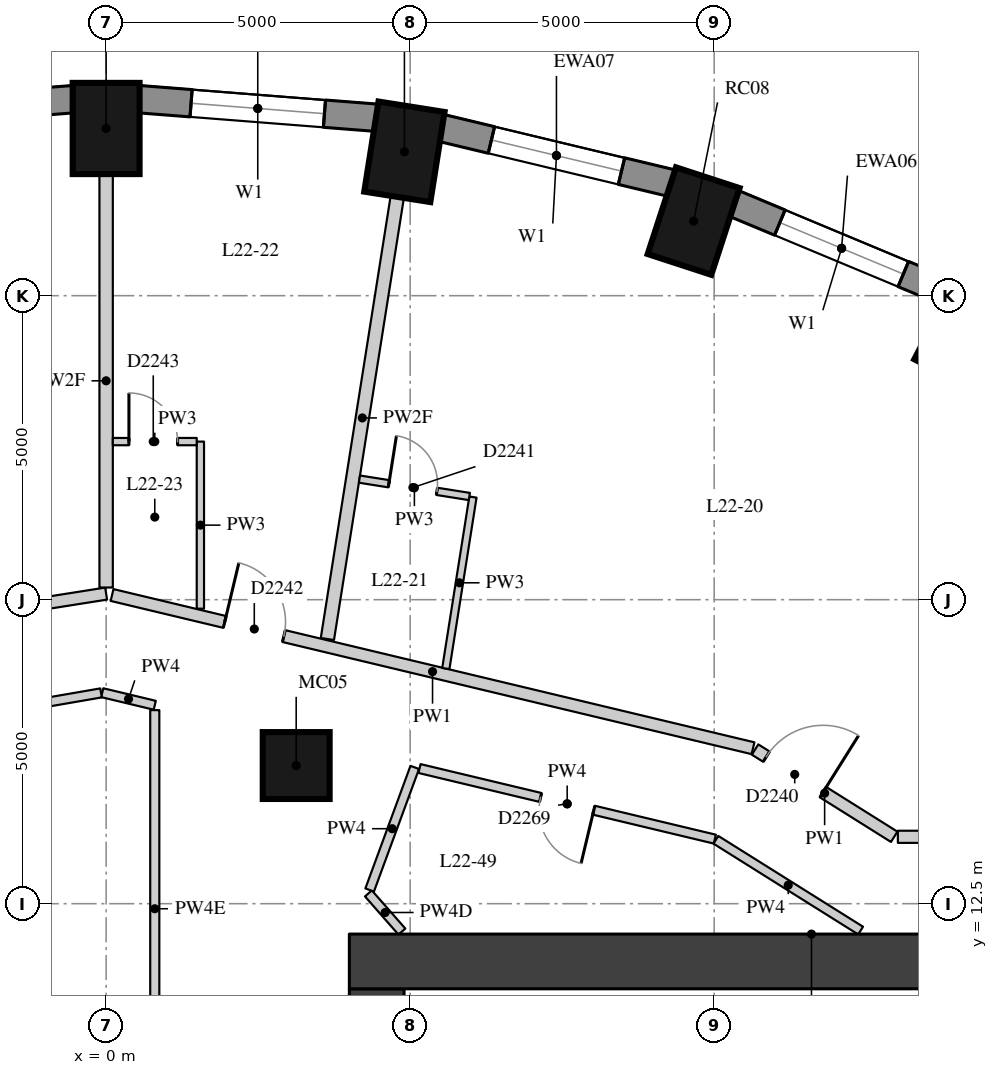
"""IFC4 building model, lengths in metres.
Left out: names, types, materials, properties, quantities, classifications, styles, units other than length and angle.
Written with IfcOpenShell. Run it as: python <this file> out.ifc"""

import sys

from ifc_helpers import new_model, si_unit, direction, frame, frame_2d, origin, origin_2d, place, context, subcontext, project, spatial, rectangle, extrude, element, fill, save


model = new_model("IFC4")
c1 = context("Model", 3, precision=1e-05, world=origin(), true_north=direction((0.0, 1.0)))
c2 = subcontext(c1, "Body", "Model", "MODEL_VIEW")
j1 = project(units=[si_unit("LENGTHUNIT", "METRE"), si_unit("PLANEANGLEUNIT", "RADIAN")], contexts=[c1])
p1 = place(None, origin())
s1 = spatial("IfcSite", under=j1, at=p1, CompositionType="ELEMENT")
p2 = place(p1, origin())
s2 = spatial("IfcBuilding", under=s1, at=p2, CompositionType="ELEMENT")
p3 = place(p2, frame((0.0, 0.0, 81.1)))
s3 = spatial("IfcBuildingStorey", under=s2, at=p3, CompositionType="ELEMENT", Elevation=81.1)
for number, where, z_axis, x_axis in (
    (1, (14.125, 21.867, 0.0), (0.0, 0.0, 1.0), (0.46, 0.888, 0.0)),
    (2, (9.662, 23.727, 0.0), (0.0, 0.0, 1.0), (0.31, 0.951, 0.0)),
    (3, (4.906, 24.866, 0.0), (0.0, 0.0, 1.0), (0.156, 0.988, 0.0)),
    (4, (0.0, 25.25, 0.0), (0.0, 0.0, 1.0), (0.0, 1.0, 0.0)),
):
    element("IfcColumn", number, at=place(p3, frame(where, z_axis=z_axis, x_axis=x_axis)), inside=s3, PredefinedType="COLUMN", context=c2, shape_type="SweptSolid", body=[
        extrude(rectangle(XDim=1.5, YDim=1.1, at=origin_2d()), origin(), (0.0, 0.0, 1.0), 3.3),
    ])
p4 = place(p3, frame((3.126, 14.772, 0.0), z_axis=(0.0, 0.0, 1.0), x_axis=(1.0, 0.0, 0.0)))
e5 = element("IfcColumn", 5, at=p4, inside=s3, PredefinedType="COLUMN", context=c2, shape_type="SweptSolid", body=[
    extrude(rectangle(XDim=1.1, YDim=1.1, at=origin_2d()), origin(), (0.0, 0.0, 1.0), 3.3),
])
p5 = place(p3, frame((13.875, 22.537, 0.0), z_axis=(0.0, 0.0, 1.0), x_axis=(-0.923031964282, 0.384723267966, 0.0)))
e6 = element("IfcWall", 6, at=p5, inside=s3, PredefinedType="SOLIDWALL", context=c2, shape_type="SweptSolid", body=[
    extrude(rectangle(XDim=3.856, YDim=0.45, at=frame_2d((1.928, 0.0))), origin(), (0.0, 0.0, 1.0), 2.85),
])
p6 = place(p5, frame((0.828, 0.0, 0.4)))
e7 = element("IfcOpeningElement", 7, at=p6, cuts=e6, PredefinedType="OPENING", context=c2, shape_type="SweptSolid", body=[
    extrude(rectangle(XDim=2.2, YDim=1.75, at=frame_2d((1.1, 0.875))), frame((0.0, 0.235, 0.0), z_axis=(0.0, -1.0, 0.0), x_axis=(1.0, 0.0, 0.0)), (0.0, 0.0, 1.0), 0.47),
])
p7 = place(p3, frame((9.308, 24.35, 0.0), z_axis=(0.0, 0.0, 1.0), x_axis=(-0.972496561493, 0.232917233979, 0.0)))
e8 = element("IfcWall", 8, at=p7, inside=s3, PredefinedType="SOLIDWALL", context=c2, shape_type="SweptSolid", body=[
    extrude(rectangle(XDim=3.911, YDim=0.45, at=frame_2d((1.956, 0.0))), origin(), (0.0, 0.0, 1.0), 2.85),
])
p8 = place(p7, frame((0.855, 0.0, 0.4)))
e9 = element("IfcOpeningElement", 9, at=p8, cuts=e8, PredefinedType="OPENING", context=c2, shape_type="SweptSolid", body=[
    extrude(rectangle(XDim=2.2, YDim=1.75, at=frame_2d((1.1, 0.875))), frame((0.0, 0.235, 0.0), z_axis=(0.0, -1.0, 0.0), x_axis=(1.0, 0.0, 0.0)), (0.0, 0.0, 1.0), 0.47),
])
p9 = place(p3, frame((4.457, 25.426, 0.0), z_axis=(0.0, 0.0, 1.0), x_axis=(-0.996955972145, 0.077966592873, 0.0)))
e10 = element("IfcWall", 10, at=p9, inside=s3, PredefinedType="SOLIDWALL", context=c2, shape_type="SweptSolid", body=[
    extrude(rectangle(XDim=3.939, YDim=0.45, at=frame_2d((1.97, 0.0))), origin(), (0.0, 0.0, 1.0), 2.85),
])
p10 = place(p9, frame((0.87, 0.0, 0.4)))
e11 = element("IfcOpeningElement", 11, at=p10, cuts=e10, PredefinedType="OPENING", context=c2, shape_type="SweptSolid", body=[
    extrude(rectangle(XDim=2.2, YDim=1.75, at=frame_2d((1.1, 0.875))), frame((0.0, 0.235, 0.0), z_axis=(0.0, -1.0, 0.0), x_axis=(1.0, 0.0, 0.0)), (0.0, 0.0, 1.0), 0.47),
])
p11 = place(p3, frame((-0.53, 25.733, 0.0), z_axis=(0.0, 0.0, 1.0), x_axis=(-0.996955972145, -0.077966592873, 0.0)))
e12 = element("IfcWall", 12, at=p11, inside=s3, PredefinedType="SOLIDWALL", context=c2, shape_type="SweptSolid", body=[
    extrude(rectangle(XDim=3.939, YDim=0.45, at=frame_2d((1.97, 0.0))), origin(), (0.0, 0.0, 1.0), 2.85),
])
p12 = place(p11, frame((0.87, 0.0, 0.4)))
e13 = element("IfcOpeningElement", 13, at=p12, cuts=e12, PredefinedType="OPENING", context=c2, shape_type="SweptSolid", body=[
    extrude(rectangle(XDim=2.2, YDim=1.75, at=frame_2d((1.1, 0.875))), frame((0.0, 0.235, 0.0), z_axis=(0.0, -1.0, 0.0), x_axis=(1.0, 0.0, 0.0)), (0.0, 0.0, 1.0), 0.47),
])
p13 = place(p3, frame((4.45, -11.1, 0.0), z_axis=(0.0, 0.0, 1.0), x_axis=(0.0, 1.0, 0.0)))
e14 = element("IfcWall", 14, at=p13, inside=s3, PredefinedType="SHEAR", context=c2, shape_type="SweptSolid", body=[
    extrude(rectangle(XDim=22.2, YDim=0.9, at=frame_2d((11.1, 0.0))), origin(), (0.0, 0.0, 1.0), 2.85),
])
p14 = place(p13, frame((2.35, 0.0, 0.0)))
e15 = element("IfcOpeningElement", 15, at=p14, cuts=e14, PredefinedType="OPENING", context=c2, shape_type="SweptSolid", body=[
    extrude(rectangle(XDim=1.5, YDim=2.1, at=frame_2d((0.75, 1.05))), frame((0.0, 0.46, 0.0), z_axis=(0.0, -1.0, 0.0), x_axis=(1.0, 0.0, 0.0)), (0.0, 0.0, 1.0), 0.92),
])
p15 = place(p13, frame((5.45, 0.0, 0.0)))
e16 = element("IfcOpeningElement", 16, at=p15, cuts=e14, PredefinedType="OPENING", context=c2, shape_type="SweptSolid", body=[
    extrude(rectangle(XDim=1.8, YDim=2.1, at=frame_2d((0.9, 1.05))), frame((0.0, 0.46, 0.0), z_axis=(0.0, -1.0, 0.0), x_axis=(1.0, 0.0, 0.0)), (0.0, 0.0, 1.0), 0.92),
])
p16 = place(p13, frame((7.95, 0.0, 0.0)))
e17 = element("IfcOpeningElement", 17, at=p16, cuts=e14, PredefinedType="OPENING", context=c2, shape_type="SweptSolid", body=[
    extrude(rectangle(XDim=1.1, YDim=2.1, at=frame_2d((0.55, 1.05))), frame((0.0, 0.46, 0.0), z_axis=(0.0, -1.0, 0.0), x_axis=(1.0, 0.0, 0.0)), (0.0, 0.0, 1.0), 0.92),
])
p17 = place(p13, frame((10.6, 0.0, 0.0)))
e18 = element("IfcOpeningElement", 18, at=p17, cuts=e14, PredefinedType="OPENING", context=c2, shape_type="SweptSolid", body=[
    extrude(rectangle(XDim=1.0, YDim=2.1, at=frame_2d((0.5, 1.05))), frame((0.0, 0.46, 0.0), z_axis=(0.0, -1.0, 0.0), x_axis=(1.0, 0.0, 0.0)), (0.0, 0.0, 1.0), 0.92),
])
p18 = place(p13, frame((13.15, 0.0, 0.0)))
e19 = element("IfcOpeningElement", 19, at=p18, cuts=e14, PredefinedType="OPENING", context=c2, shape_type="SweptSolid", body=[
    extrude(rectangle(XDim=1.1, YDim=2.1, at=frame_2d((0.55, 1.05))), frame((0.0, 0.46, 0.0), z_axis=(0.0, -1.0, 0.0), x_axis=(1.0, 0.0, 0.0)), (0.0, 0.0, 1.0), 0.92),
])
p19 = place(p13, frame((14.95, 0.0, 0.0)))
e20 = element("IfcOpeningElement", 20, at=p19, cuts=e14, PredefinedType="OPENING", context=c2, shape_type="SweptSolid", body=[
    extrude(rectangle(XDim=1.8, YDim=2.1, at=frame_2d((0.9, 1.05))), frame((0.0, 0.46, 0.0), z_axis=(0.0, -1.0, 0.0), x_axis=(1.0, 0.0, 0.0)), (0.0, 0.0, 1.0), 0.92),
])
p20 = place(p13, frame((18.35, 0.0, 0.0)))
e21 = element("IfcOpeningElement", 21, at=p20, cuts=e14, PredefinedType="OPENING", context=c2, shape_type="SweptSolid", body=[
    extrude(rectangle(XDim=1.5, YDim=2.1, at=frame_2d((0.75, 1.05))), frame((0.0, 0.46, 0.0), z_axis=(0.0, -1.0, 0.0), x_axis=(1.0, 0.0, 0.0)), (0.0, 0.0, 1.0), 0.92),
])
p21 = place(p3, frame((4.0, 11.55, 0.0), z_axis=(0.0, 0.0, 1.0), x_axis=(1.0, 0.0, 0.0)))
e22 = element("IfcWall", 22, at=p21, inside=s3, PredefinedType="SHEAR", context=c2, shape_type="SweptSolid", body=[
    extrude(rectangle(XDim=15.2, YDim=0.9, at=frame_2d((7.6, 0.0))), origin(), (0.0, 0.0, 1.0), 2.85),
])
p22 = place(p3, frame((-7.194, 16.466, 0.0), z_axis=(0.0, 0.0, 1.0), x_axis=(0.987792302219, 0.155776659599, 0.0)))
e23 = element("IfcWall", 23, at=p22, inside=s3, PredefinedType="PARTITIONING", context=c2, shape_type="SweptSolid", body=[
    extrude(rectangle(XDim=7.283, YDim=0.2, at=frame_2d((3.642, 0.0))), origin(), (0.0, 0.0, 1.0), 2.85),
])
p23 = place(p22, frame((2.27, 0.0, 0.0)))
e24 = element("IfcOpeningElement", 24, at=p23, cuts=e23, PredefinedType="OPENING", context=c2, shape_type="SweptSolid", body=[
    extrude(rectangle(XDim=1.1, YDim=2.1, at=frame_2d((0.55, 1.05))), frame((0.0, 0.11, 0.0), z_axis=(0.0, -1.0, 0.0), x_axis=(1.0, 0.0, 0.0)), (0.0, 0.0, 1.0), 0.22),
])
p24 = place(p3, frame((0.098, 17.577, 0.0), z_axis=(0.0, 0.0, 1.0), x_axis=(0.97259262522, -0.232515774447, 0.0)))
e25 = element("IfcWall", 25, at=p24, inside=s3, PredefinedType="PARTITIONING", context=c2, shape_type="SweptSolid", body=[
    extrude(rectangle(XDim=10.838, YDim=0.2, at=frame_2d((5.419, 0.0))), origin(), (0.0, 0.0, 1.0), 2.85),
])
p25 = place(p24, frame((1.905, 0.0, 0.0)))
e26 = element("IfcOpeningElement", 26, at=p25, cuts=e25, PredefinedType="OPENING", context=c2, shape_type="SweptSolid", body=[
    extrude(rectangle(XDim=1.0, YDim=2.1, at=frame_2d((0.5, 1.05))), frame((0.0, 0.11, 0.0), z_axis=(0.0, -1.0, 0.0), x_axis=(1.0, 0.0, 0.0)), (0.0, 0.0, 1.0), 0.22),
])
p26 = place(p3, frame((10.672, 15.035, 0.0), z_axis=(0.0, 0.0, 1.0), x_axis=(0.847149253931, -0.531355005213, 0.0)))
e27 = element("IfcWall", 27, at=p26, inside=s3, PredefinedType="PARTITIONING", context=c2, shape_type="SweptSolid", body=[
    extrude(rectangle(XDim=2.701, YDim=0.2, at=frame_2d((1.351, 0.0))), origin(), (0.0, 0.0, 1.0), 2.85),
])
p27 = place(p26, frame((0.22, 0.0, 0.0)))
e28 = element("IfcOpeningElement", 28, at=p27, cuts=e27, PredefinedType="OPENING", context=c2, shape_type="SweptSolid", body=[
    extrude(rectangle(XDim=1.1, YDim=2.1, at=frame_2d((0.55, 1.05))), frame((0.0, 0.11, 0.0), z_axis=(0.0, -1.0, 0.0), x_axis=(1.0, 0.0, 0.0)), (0.0, 0.0, 1.0), 0.22),
])
p28 = place(p3, frame((13.021, 13.6, 0.0), z_axis=(0.0, 0.0, 1.0), x_axis=(1.0, 0.0, 0.0)))
e29 = element("IfcWall", 29, at=p28, inside=s3, PredefinedType="PARTITIONING", context=c2, shape_type="SweptSolid", body=[
    extrude(rectangle(XDim=7.779, YDim=0.2, at=frame_2d((3.89, 0.0))), origin(), (0.0, 0.0, 1.0), 2.85),
])
p29 = place(p3, frame((-0.064, 15.97, 0.0), z_axis=(0.0, 0.0, 1.0), x_axis=(0.97258159508, -0.232561907699, 0.0)))
e30 = element("IfcWall", 30, at=p29, inside=s3, PredefinedType="PARTITIONING", context=c2, shape_type="SweptSolid", body=[
    extrude(rectangle(XDim=0.888, YDim=0.15, at=frame_2d((0.444, 0.0))), origin(), (0.0, 0.0, 1.0), 2.85),
])
p30 = place(p3, frame((0.8, 15.684, 0.0), z_axis=(0.0, 0.0, 1.0), x_axis=(0.0, -1.0, 0.0)))
e31 = element("IfcWall", 31, at=p30, inside=s3, PredefinedType="PARTITIONING", context=c2, shape_type="SweptSolid", body=[
    extrude(rectangle(XDim=6.534, YDim=0.15, at=frame_2d((3.267, 0.0))), origin(), (0.0, 0.0, 1.0), 2.3),
])
p31 = place(p3, frame((-7.021, 14.769, 0.0), z_axis=(0.0, 0.0, 1.0), x_axis=(0.985427060344, 0.170098526569, 0.0)))
e32 = element("IfcWall", 32, at=p31, inside=s3, PredefinedType="PARTITIONING", context=c2, shape_type="SweptSolid", body=[
    extrude(rectangle(XDim=7.04, YDim=0.15, at=frame_2d((3.52, 0.0))), origin(), (0.0, 0.0, 1.0), 2.4),
])
p32 = place(p3, frame((4.865, 12.042, 0.0), z_axis=(0.0, 0.0, 1.0), x_axis=(-0.660014599896, 0.751252772323, 0.0)))
e33 = element("IfcWall", 33, at=p32, inside=s3, PredefinedType="PARTITIONING", context=c2, shape_type="SweptSolid", body=[
    extrude(rectangle(XDim=0.835, YDim=0.15, at=frame_2d((0.417, 0.0))), origin(), (0.0, 0.0, 1.0), 2.4),
])
p33 = place(p3, frame((4.334, 12.725, 0.0), z_axis=(0.0, 0.0, 1.0), x_axis=(0.345226102509, 0.938519545959, 0.0)))
e34 = element("IfcWall", 34, at=p33, inside=s3, PredefinedType="PARTITIONING", context=c2, shape_type="SweptSolid", body=[
    extrude(rectangle(XDim=2.148, YDim=0.15, at=frame_2d((1.074, 0.0))), origin(), (0.0, 0.0, 1.0), 2.85),
])
p34 = place(p3, frame((5.154, 14.723, 0.0), z_axis=(0.0, 0.0, 1.0), x_axis=(0.972595476038, -0.232503849411, 0.0)))
e35 = element("IfcWall", 35, at=p34, inside=s3, PredefinedType="PARTITIONING", context=c2, shape_type="SweptSolid", body=[
    extrude(rectangle(XDim=4.994, YDim=0.15, at=frame_2d((2.497, 0.0))), origin(), (0.0, 0.0, 1.0), 2.85),
])
p35 = place(p34, frame((2.047, 0.0, 0.0)))
e36 = element("IfcOpeningElement", 36, at=p35, cuts=e35, PredefinedType="OPENING", context=c2, shape_type="SweptSolid", body=[
    extrude(rectangle(XDim=0.9, YDim=2.1, at=frame_2d((0.45, 1.05))), frame((0.0, 0.085, 0.0), z_axis=(0.0, -1.0, 0.0), x_axis=(1.0, 0.0, 0.0)), (0.0, 0.0, 1.0), 0.17),
])
p36 = place(p3, frame((10.028, 13.551, 0.0), z_axis=(0.0, 0.0, 1.0), x_axis=(0.847128314977, -0.531388387118, 0.0)))
e37 = element("IfcWall", 37, at=p36, inside=s3, PredefinedType="PARTITIONING", context=c2, shape_type="SweptSolid", body=[
    extrude(rectangle(XDim=2.81, YDim=0.15, at=frame_2d((1.405, 0.0))), origin(), (0.0, 0.0, 1.0), 2.85),
])
p37 = place(p3, frame((4.788, 24.125, 0.0), z_axis=(0.0, 0.0, 1.0), x_axis=(-0.156122641138, -0.987737678194, 0.0)))
e38 = element("IfcWall", 38, at=p37, inside=s3, PredefinedType="PARTITIONING", context=c2, shape_type="SweptSolid", body=[
    extrude(rectangle(XDim=7.362, YDim=0.22, at=frame_2d((3.681, 0.0))), origin(), (0.0, 0.0, 1.0), 2.3),
])
p38 = place(p3, frame((0.0, 24.5, 0.0), z_axis=(0.0, 0.0, 1.0), x_axis=(0.0, -1.0, 0.0)))
e39 = element("IfcWall", 39, at=p38, inside=s3, PredefinedType="PARTITIONING", context=c2, shape_type="SweptSolid", body=[
    extrude(rectangle(XDim=6.8, YDim=0.22, at=frame_2d((3.4, 0.0))), origin(), (0.0, 0.0, 1.0), 2.3),
])
p39 = place(p3, frame((5.587, 16.367, 0.0), z_axis=(0.0, 0.0, 1.0), x_axis=(0.15619964473, 0.987725503865, 0.0)))
e40 = element("IfcWall", 40, at=p39, inside=s3, PredefinedType="PARTITIONING", context=c2, shape_type="SweptSolid", body=[
    extrude(rectangle(XDim=2.856, YDim=0.12, at=frame_2d((1.428, 0.0))), origin(), (0.0, 0.0, 1.0), 2.85),
])
p40 = place(p3, frame((1.55, 17.352, 0.0), z_axis=(0.0, 0.0, 1.0), x_axis=(0.0, 1.0, 0.0)))
e41 = element("IfcWall", 41, at=p40, inside=s3, PredefinedType="PARTITIONING", context=c2, shape_type="SweptSolid", body=[
    extrude(rectangle(XDim=2.748, YDim=0.12, at=frame_2d((1.374, 0.0))), origin(), (0.0, 0.0, 1.0), 2.85),
])
p41 = place(p3, frame((5.973, 19.197, 0.0), z_axis=(0.0, 0.0, 1.0), x_axis=(-0.98771965546, 0.156236622524, 0.0)))
e42 = element("IfcWall", 42, at=p41, inside=s3, PredefinedType="PARTITIONING", context=c2, shape_type="SweptSolid", body=[
    extrude(rectangle(XDim=1.83, YDim=0.12, at=frame_2d((0.915, 0.0))), origin(), (0.0, 0.0, 1.0), 2.85),
])
p42 = place(p41, frame((0.54, 0.0, 0.0)))
e43 = element("IfcOpeningElement", 43, at=p42, cuts=e42, PredefinedType="OPENING", context=c2, shape_type="SweptSolid", body=[
    extrude(rectangle(XDim=0.8, YDim=2.1, at=frame_2d((0.4, 1.05))), frame((0.0, 0.07, 0.0), z_axis=(0.0, -1.0, 0.0), x_axis=(1.0, 0.0, 0.0)), (0.0, 0.0, 1.0), 0.14),
])
p43 = place(p3, frame((1.49, 20.1, 0.0), z_axis=(0.0, 0.0, 1.0), x_axis=(-1.0, 0.0, 0.0)))
e44 = element("IfcWall", 44, at=p43, inside=s3, PredefinedType="PARTITIONING", context=c2, shape_type="SweptSolid", body=[
    extrude(rectangle(XDim=1.38, YDim=0.12, at=frame_2d((0.69, 0.0))), origin(), (0.0, 0.0, 1.0), 2.85),
])
p44 = place(p43, frame((0.315, 0.0, 0.0)))
e45 = element("IfcOpeningElement", 45, at=p44, cuts=e44, PredefinedType="OPENING", context=c2, shape_type="SweptSolid", body=[
    extrude(rectangle(XDim=0.8, YDim=2.1, at=frame_2d((0.4, 1.05))), frame((0.0, 0.07, 0.0), z_axis=(0.0, -1.0, 0.0), x_axis=(1.0, 0.0, 0.0)), (0.0, 0.0, 1.0), 0.14),
])
p45 = place(p6, origin())
e46 = element("IfcWindow", 46, at=p45, inside=s3, PartitioningType="SINGLE_PANEL", PredefinedType="WINDOW", context=c2, shape_type="SweptSolid", body=[
    extrude(rectangle(XDim=2.2, YDim=1.75, at=frame_2d((1.1, 0.875))), frame((0.0, 0.035, 0.0), z_axis=(0.0, -1.0, 0.0), x_axis=(1.0, 0.0, 0.0)), (0.0, 0.0, 1.0), 0.06),
])
fill(e7, e46)
p46 = place(p8, origin())
e47 = element("IfcWindow", 47, at=p46, inside=s3, PartitioningType="SINGLE_PANEL", PredefinedType="WINDOW", context=c2, shape_type="SweptSolid", body=[
    extrude(rectangle(XDim=2.2, YDim=1.75, at=frame_2d((1.1, 0.875))), frame((0.0, 0.035, 0.0), z_axis=(0.0, -1.0, 0.0), x_axis=(1.0, 0.0, 0.0)), (0.0, 0.0, 1.0), 0.06),
])
fill(e9, e47)
p47 = place(p10, origin())
e48 = element("IfcWindow", 48, at=p47, inside=s3, PartitioningType="SINGLE_PANEL", PredefinedType="WINDOW", context=c2, shape_type="SweptSolid", body=[
    extrude(rectangle(XDim=2.2, YDim=1.75, at=frame_2d((1.1, 0.875))), frame((0.0, 0.035, 0.0), z_axis=(0.0, -1.0, 0.0), x_axis=(1.0, 0.0, 0.0)), (0.0, 0.0, 1.0), 0.06),
])
fill(e11, e48)
p48 = place(p27, origin())
e49 = element("IfcDoor", 49, at=p48, inside=s3, OperationType="SINGLE_SWING_RIGHT", PredefinedType="DOOR", context=c2, shape_type="SweptSolid", body=[
    extrude(rectangle(XDim=1.1, YDim=2.1, at=frame_2d((0.55, 1.05))), frame((0.0, 0.025, 0.0), z_axis=(0.0, -1.0, 0.0), x_axis=(1.0, 0.0, 0.0)), (0.0, 0.0, 1.0), 0.05),
])
fill(e28, e49)
p49 = place(p42, origin())
e50 = element("IfcDoor", 50, at=p49, inside=s3, OperationType="SINGLE_SWING_LEFT", PredefinedType="DOOR", context=c2, shape_type="SweptSolid", body=[
    extrude(rectangle(XDim=0.8, YDim=2.1, at=frame_2d((0.4, 1.05))), frame((0.0, 0.025, 0.0), z_axis=(0.0, -1.0, 0.0), x_axis=(1.0, 0.0, 0.0)), (0.0, 0.0, 1.0), 0.05),
])
fill(e43, e50)
p50 = place(p25, origin())
e51 = element("IfcDoor", 51, at=p50, inside=s3, OperationType="SINGLE_SWING_LEFT", PredefinedType="DOOR", context=c2, shape_type="SweptSolid", body=[
    extrude(rectangle(XDim=1.0, YDim=2.1, at=frame_2d((0.5, 1.05))), frame((0.0, 0.025, 0.0), z_axis=(0.0, -1.0, 0.0), x_axis=(1.0, 0.0, 0.0)), (0.0, 0.0, 1.0), 0.05),
])
fill(e26, e51)
p51 = place(p44, origin())
e52 = element("IfcDoor", 52, at=p51, inside=s3, OperationType="SINGLE_SWING_LEFT", PredefinedType="DOOR", context=c2, shape_type="SweptSolid", body=[
    extrude(rectangle(XDim=0.8, YDim=2.1, at=frame_2d((0.4, 1.05))), frame((0.0, 0.025, 0.0), z_axis=(0.0, -1.0, 0.0), x_axis=(1.0, 0.0, 0.0)), (0.0, 0.0, 1.0), 0.05),
])
fill(e45, e52)
p52 = place(p35, origin())
e53 = element("IfcDoor", 53, at=p52, inside=s3, OperationType="SINGLE_SWING_LEFT", PredefinedType="DOOR", context=c2, shape_type="SweptSolid", body=[
    extrude(rectangle(XDim=0.9, YDim=2.1, at=frame_2d((0.45, 1.05))), frame((0.0, 0.025, 0.0), z_axis=(0.0, -1.0, 0.0), x_axis=(1.0, 0.0, 0.0)), (0.0, 0.0, 1.0), 0.05),
])
fill(e36, e53)
save(model, sys.argv[1])
